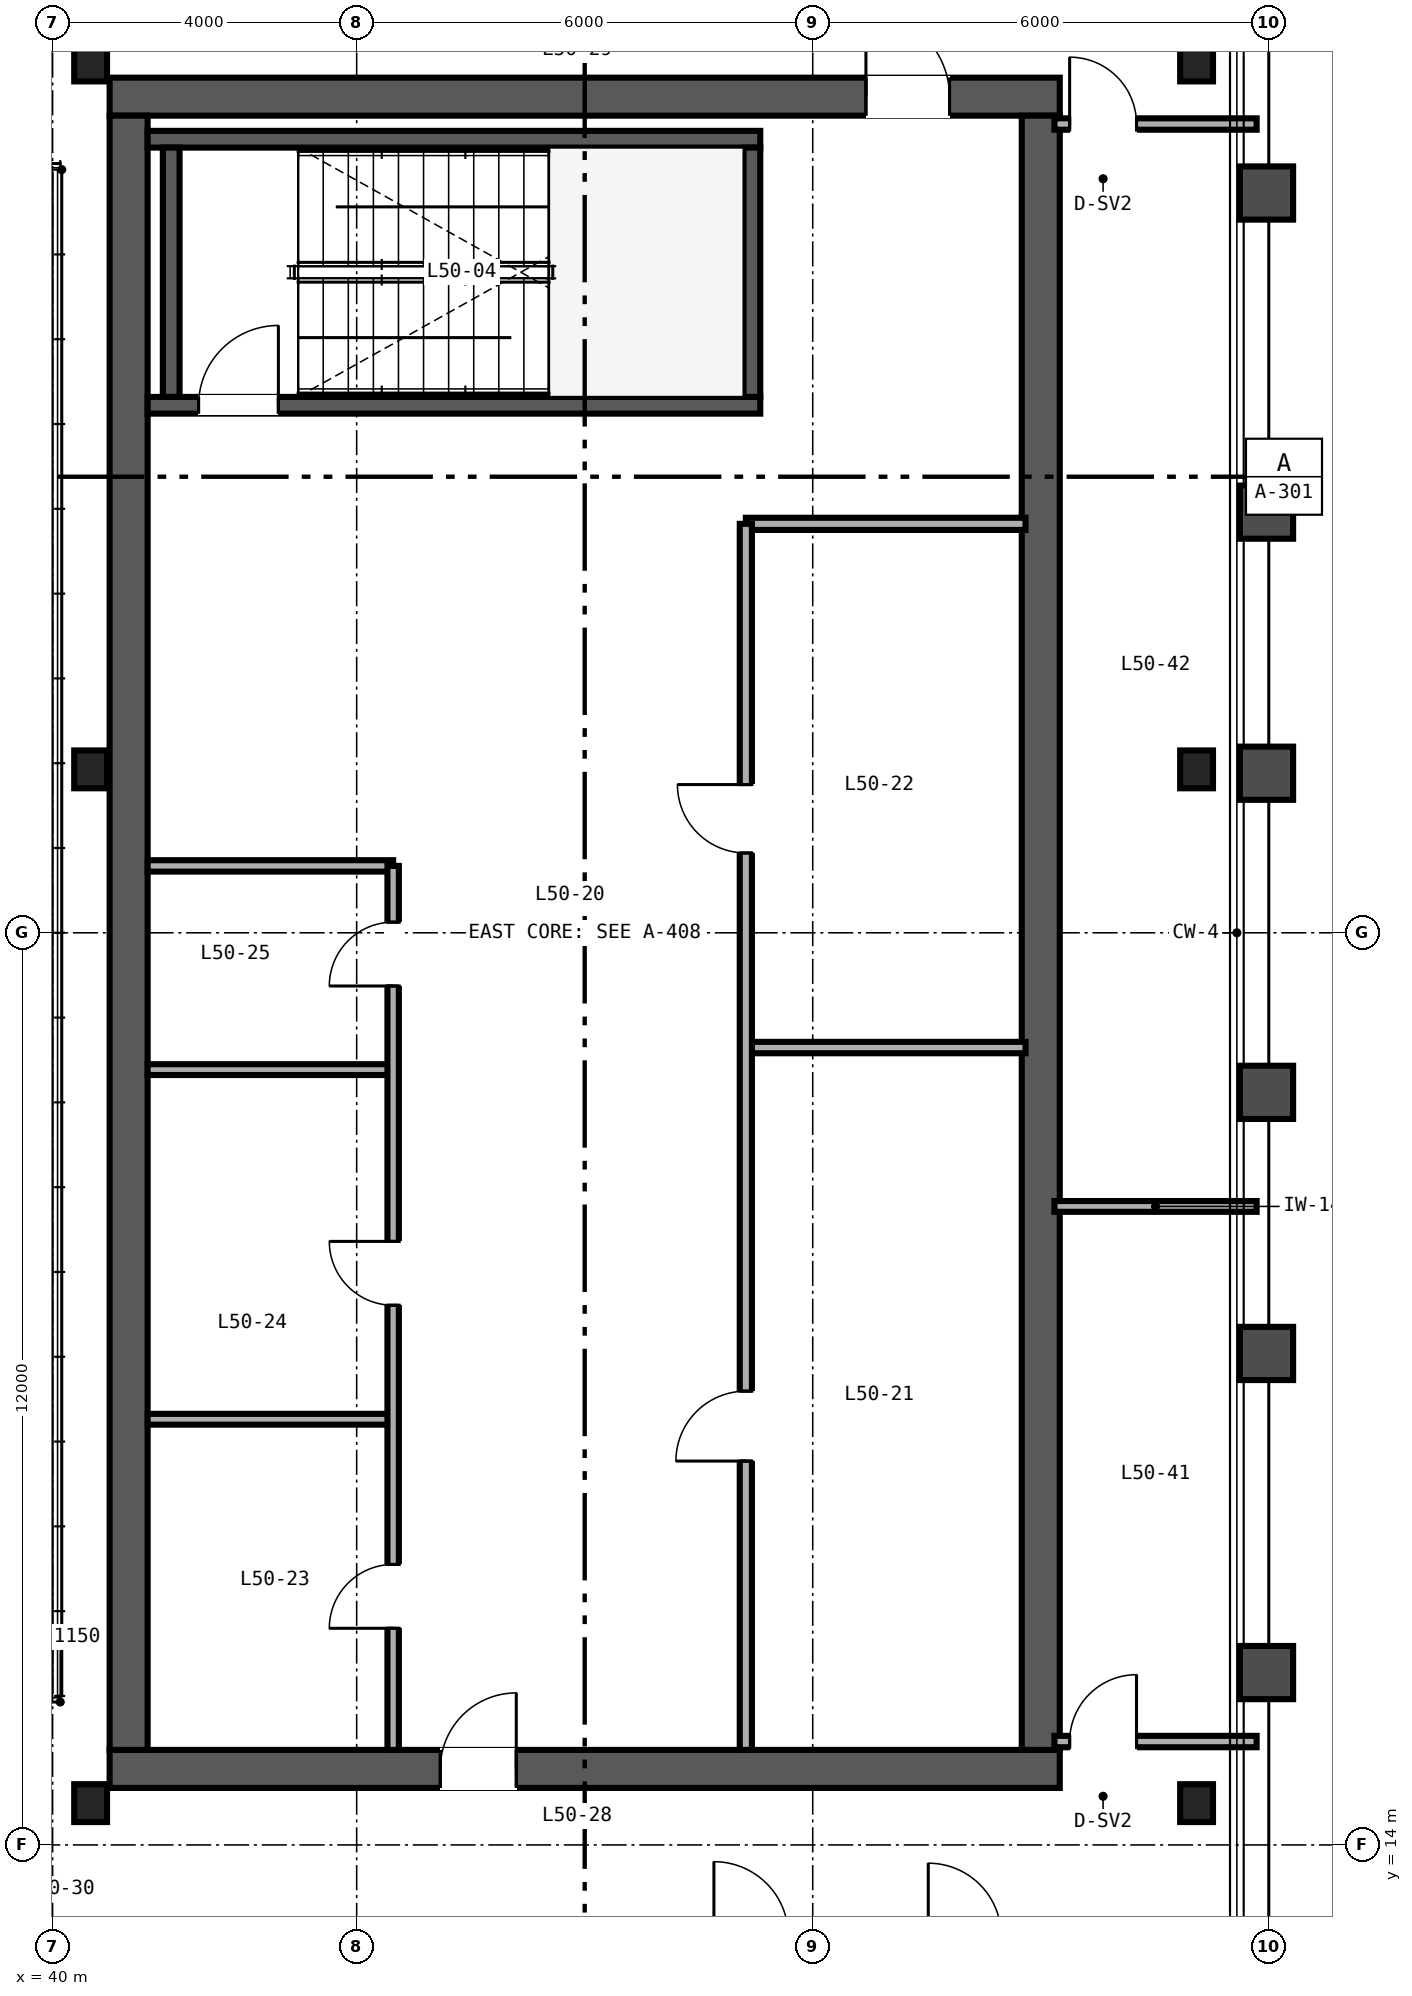
"""IFC4 building model, lengths in metres.
Left out: names, types, materials, properties, quantities, classifications, styles, units other than length and angle.
Written with IfcOpenShell. Run it as: python <this file> out.ifc"""

import sys

from ifc_helpers import new_model, si_unit, direction, frame, frame_2d, origin, origin_2d, place, context, subcontext, project, spatial, rectangle, i_section, extrude, source, transform, mapped, element, fill, save


model = new_model("IFC4")
c1 = context("Model", 3, precision=1e-05, world=origin(), true_north=direction((0.0, 1.0)))
c2 = subcontext(c1, "Body", "Model", "MODEL_VIEW")
j1 = project(units=[si_unit("LENGTHUNIT", "METRE"), si_unit("PLANEANGLEUNIT", "RADIAN")], contexts=[c1])
p1 = place(None, origin())
s1 = spatial("IfcSite", under=j1, at=p1, CompositionType="ELEMENT")
p2 = place(p1, origin())
s2 = spatial("IfcBuilding", under=s1, at=p2, CompositionType="ELEMENT")
p3 = place(p2, frame((0.0, 0.0, 199.2)))
s3 = spatial("IfcBuildingStorey", under=s2, at=p3, CompositionType="ELEMENT", Elevation=199.2)
p4 = place(p3, frame((40.75, 15.0, 0.0), z_axis=(0.0, 0.0, 1.0), x_axis=(1.0, 0.0, 0.0)))
e1 = element("IfcWall", 1, at=p4, inside=s3, PredefinedType="SHEAR", context=c2, shape_type="SweptSolid", body=[
    extrude(rectangle(XDim=12.5, YDim=0.5, at=frame_2d((6.25, 0.0))), origin(), (0.0, 0.0, 1.0), 3.37),
])
p5 = place(p4, frame((4.35, 0.0, 0.0)))
e2 = element("IfcOpeningElement", 2, at=p5, cuts=e1, PredefinedType="OPENING", context=c2, shape_type="SweptSolid", body=[
    extrude(rectangle(XDim=1.0, YDim=2.15, at=frame_2d((0.5, 1.075))), frame((0.0, 0.26, 0.0), z_axis=(0.0, -1.0, 0.0), x_axis=(1.0, 0.0, 0.0)), (0.0, 0.0, 1.0), 0.52),
])
p6 = place(p3, frame((40.75, 37.0, 0.0), z_axis=(0.0, 0.0, 1.0), x_axis=(1.0, 0.0, 0.0)))
e3 = element("IfcWall", 3, at=p6, inside=s3, PredefinedType="SHEAR", context=c2, shape_type="SweptSolid", body=[
    extrude(rectangle(XDim=12.5, YDim=0.5, at=frame_2d((6.25, 0.0))), origin(), (0.0, 0.0, 1.0), 3.37),
])
p7 = place(p6, frame((9.95, 0.0, 0.0)))
e4 = element("IfcOpeningElement", 4, at=p7, cuts=e3, PredefinedType="OPENING", context=c2, shape_type="SweptSolid", body=[
    extrude(rectangle(XDim=1.1, YDim=2.15, at=frame_2d((0.55, 1.075))), frame((0.0, 0.26, 0.0), z_axis=(0.0, -1.0, 0.0), x_axis=(1.0, 0.0, 0.0)), (0.0, 0.0, 1.0), 0.52),
])
for number, where, z_axis, x_axis in (
    (5, (41.0, 15.25, 0.0), (0.0, 0.0, 1.0), (0.0, 1.0, 0.0)),
    (6, (53.0, 15.25, 0.0), (0.0, 0.0, 1.0), (0.0, 1.0, 0.0)),
):
    element("IfcWall", number, at=place(p3, frame(where, z_axis=z_axis, x_axis=x_axis)), inside=s3, PredefinedType="SHEAR", context=c2, shape_type="SweptSolid", body=[
        extrude(rectangle(XDim=21.5, YDim=0.5, at=frame_2d((10.75, 0.0))), origin(), (0.0, 0.0, 1.0), 3.37),
    ])
p8 = place(p3, frame((41.25, 32.94, 0.0), z_axis=(0.0, 0.0, 1.0), x_axis=(1.0, 0.0, 0.0)))
e7 = element("IfcWall", 7, at=p8, inside=s3, PredefinedType="SHEAR", context=c2, shape_type="SweptSolid", body=[
    extrude(rectangle(XDim=8.06, YDim=0.22, at=frame_2d((4.03, 0.0))), origin(), (0.0, 0.0, 1.0), 3.4),
])
p9 = place(p8, frame((0.67, 0.0, 0.0)))
e8 = element("IfcOpeningElement", 8, at=p9, cuts=e7, PredefinedType="OPENING", context=c2, shape_type="SweptSolid", body=[
    extrude(rectangle(XDim=1.05, YDim=2.15, at=frame_2d((0.525, 1.075))), frame((0.0, 0.12, 0.0), z_axis=(0.0, -1.0, 0.0), x_axis=(1.0, 0.0, 0.0)), (0.0, 0.0, 1.0), 0.24),
])
p10 = place(p3, frame((41.25, 36.44, 0.0), z_axis=(0.0, 0.0, 1.0), x_axis=(1.0, 0.0, 0.0)))
e9 = element("IfcWall", 9, at=p10, inside=s3, PredefinedType="SHEAR", context=c2, shape_type="SweptSolid", body=[
    extrude(rectangle(XDim=8.06, YDim=0.22, at=frame_2d((4.03, 0.0))), origin(), (0.0, 0.0, 1.0), 3.4),
])
for number, where, z_axis, x_axis in (
    (10, (41.56, 33.05, 0.0), (0.0, 0.0, 1.0), (0.0, 1.0, 0.0)),
    (11, (49.2, 33.05, 0.0), (0.0, 0.0, 1.0), (0.0, 1.0, 0.0)),
):
    element("IfcWall", number, at=place(p3, frame(where, z_axis=z_axis, x_axis=x_axis)), inside=s3, PredefinedType="SHEAR", context=c2, shape_type="SweptSolid", body=[
        extrude(rectangle(XDim=3.28, YDim=0.22, at=frame_2d((1.64, 0.0))), origin(), (0.0, 0.0, 1.0), 3.4),
    ])
m1 = source(origin(), c2, "Body", "SweptSolid", [
    extrude(i_section(OverallWidth=0.432, OverallDepth=0.498, WebThickness=0.056, FlangeThickness=0.089, FilletRadius=0.025, at=origin_2d()), origin(), (0.0, 0.0, 1.0), 3.37),
])
for number, where, z_axis, x_axis in (
    (12, (40.5, 14.55, 0.0), (0.0, 0.0, 1.0), (1.0, 0.0, 0.0)),
    (13, (55.05, 14.55, 0.0), (0.0, 0.0, 1.0), (1.0, 0.0, 0.0)),
    (14, (40.5, 28.15, 0.0), (0.0, 0.0, 1.0), (1.0, 0.0, 0.0)),
    (15, (55.05, 28.15, 0.0), (0.0, 0.0, 1.0), (1.0, 0.0, 0.0)),
    (16, (40.5, 37.45, 0.0), (0.0, 0.0, 1.0), (1.0, 0.0, 0.0)),
    (17, (55.05, 37.45, 0.0), (0.0, 0.0, 1.0), (1.0, 0.0, 0.0)),
):
    element("IfcColumn", number, at=place(p3, frame(where, z_axis=z_axis, x_axis=x_axis)), inside=s3, PredefinedType="COLUMN", context=c2, shape_type="MappedRepresentation", body=[
        mapped(m1, transform((0.0, 0.0, 0.0), scale=1.0)),
    ])
p11 = place(p3, frame((49.12, 31.38, 0.0), z_axis=(0.0, 0.0, 1.0), x_axis=(1.0, 0.0, 0.0)))
e18 = element("IfcWall", 18, at=p11, inside=s3, PredefinedType="PARTITIONING", context=c2, shape_type="SweptSolid", body=[
    extrude(rectangle(XDim=3.68, YDim=0.16, at=frame_2d((1.84, 0.0))), origin(), (0.0, 0.0, 1.0), 2.47),
])
p12 = place(p3, frame((49.12, 24.49, 0.0), z_axis=(0.0, 0.0, 1.0), x_axis=(1.0, 0.0, 0.0)))
e19 = element("IfcWall", 19, at=p12, inside=s3, PredefinedType="PARTITIONING", context=c2, shape_type="SweptSolid", body=[
    extrude(rectangle(XDim=3.68, YDim=0.15, at=frame_2d((1.84, 0.0))), origin(), (0.0, 0.0, 1.0), 3.37),
])
p13 = place(p3, frame((49.12, 15.25, 0.0), z_axis=(0.0, 0.0, 1.0), x_axis=(0.0, 1.0, 0.0)))
e20 = element("IfcWall", 20, at=p13, inside=s3, PredefinedType="PARTITIONING", context=c2, shape_type="SweptSolid", body=[
    extrude(rectangle(XDim=16.13, YDim=0.16, at=frame_2d((8.065, 0.0))), origin(), (0.0, 0.0, 1.0), 2.443),
])
p14 = place(p13, frame((3.8, 0.0, 0.0)))
e21 = element("IfcOpeningElement", 21, at=p14, cuts=e20, PredefinedType="OPENING", context=c2, shape_type="SweptSolid", body=[
    extrude(rectangle(XDim=0.92, YDim=2.15, at=frame_2d((0.46, 1.075))), frame((0.0, 0.09, 0.0), z_axis=(0.0, -1.0, 0.0), x_axis=(1.0, 0.0, 0.0)), (0.0, 0.0, 1.0), 0.18),
])
p15 = place(p13, frame((11.8, 0.0, 0.0)))
e22 = element("IfcOpeningElement", 22, at=p15, cuts=e20, PredefinedType="OPENING", context=c2, shape_type="SweptSolid", body=[
    extrude(rectangle(XDim=0.9, YDim=2.15, at=frame_2d((0.45, 1.075))), frame((0.0, 0.09, 0.0), z_axis=(0.0, -1.0, 0.0), x_axis=(1.0, 0.0, 0.0)), (0.0, 0.0, 1.0), 0.18),
])
p16 = place(p3, frame((41.25, 26.88, 0.0), z_axis=(0.0, 0.0, 1.0), x_axis=(1.0, 0.0, 0.0)))
e23 = element("IfcWall", 23, at=p16, inside=s3, PredefinedType="PARTITIONING", context=c2, shape_type="SweptSolid", body=[
    extrude(rectangle(XDim=3.23, YDim=0.15, at=frame_2d((1.615, 0.0))), origin(), (0.0, 0.0, 1.0), 3.37),
])
for number, where, z_axis, x_axis in (
    (24, (41.25, 19.6, 0.0), (0.0, 0.0, 1.0), (1.0, 0.0, 0.0)),
    (25, (41.25, 24.2, 0.0), (0.0, 0.0, 1.0), (1.0, 0.0, 0.0)),
):
    element("IfcWall", number, at=place(p3, frame(where, z_axis=z_axis, x_axis=x_axis)), inside=s3, PredefinedType="PARTITIONING", context=c2, shape_type="SweptSolid", body=[
        extrude(rectangle(XDim=3.23, YDim=0.142, at=frame_2d((1.615, 0.0))), origin(), (0.0, 0.0, 1.0), 3.37),
    ])
p17 = place(p3, frame((44.48, 15.25, 0.0), z_axis=(0.0, 0.0, 1.0), x_axis=(0.0, 1.0, 0.0)))
e26 = element("IfcWall", 26, at=p17, inside=s3, PredefinedType="PARTITIONING", context=c2, shape_type="SweptSolid", body=[
    extrude(rectangle(XDim=11.63, YDim=0.15, at=frame_2d((5.815, 0.0))), origin(), (0.0, 0.0, 1.0), 3.37),
])
p18 = place(p17, frame((1.6, 0.0, 0.0)))
e27 = element("IfcOpeningElement", 27, at=p18, cuts=e26, PredefinedType="OPENING", context=c2, shape_type="SweptSolid", body=[
    extrude(rectangle(XDim=0.84, YDim=2.1, at=frame_2d((0.42, 1.05))), frame((0.0, 0.085, 0.0), z_axis=(0.0, -1.0, 0.0), x_axis=(1.0, 0.0, 0.0)), (0.0, 0.0, 1.0), 0.17),
])
p19 = place(p17, frame((5.85, 0.0, 0.0)))
e28 = element("IfcOpeningElement", 28, at=p19, cuts=e26, PredefinedType="OPENING", context=c2, shape_type="SweptSolid", body=[
    extrude(rectangle(XDim=0.84, YDim=2.1, at=frame_2d((0.42, 1.05))), frame((0.0, 0.085, 0.0), z_axis=(0.0, -1.0, 0.0), x_axis=(1.0, 0.0, 0.0)), (0.0, 0.0, 1.0), 0.17),
])
p20 = place(p17, frame((10.05, 0.0, 0.0)))
e29 = element("IfcOpeningElement", 29, at=p20, cuts=e26, PredefinedType="OPENING", context=c2, shape_type="SweptSolid", body=[
    extrude(rectangle(XDim=0.84, YDim=2.1, at=frame_2d((0.42, 1.05))), frame((0.0, 0.085, 0.0), z_axis=(0.0, -1.0, 0.0), x_axis=(1.0, 0.0, 0.0)), (0.0, 0.0, 1.0), 0.17),
])
p21 = place(p3, frame((53.18, 15.36, 0.0), z_axis=(0.0, 0.0, 1.0), x_axis=(1.0, 0.0, 0.0)))
e30 = element("IfcWall", 30, at=p21, inside=s3, PredefinedType="PARTITIONING", context=c2, shape_type="SweptSolid", body=[
    extrude(rectangle(XDim=2.66, YDim=0.15, at=frame_2d((1.33, 0.0))), origin(), (0.0, 0.0, 1.0), 2.591),
])
p22 = place(p21, frame((0.2, 0.0, 0.0)))
e31 = element("IfcOpeningElement", 31, at=p22, cuts=e30, PredefinedType="OPENING", context=c2, shape_type="SweptSolid", body=[
    extrude(rectangle(XDim=0.88, YDim=2.15, at=frame_2d((0.44, 1.075))), frame((0.0, 0.085, 0.0), z_axis=(0.0, -1.0, 0.0), x_axis=(1.0, 0.0, 0.0)), (0.0, 0.0, 1.0), 0.17),
])
p23 = place(p3, frame((53.18, 36.64, 0.0), z_axis=(0.0, 0.0, 1.0), x_axis=(1.0, 0.0, 0.0)))
e32 = element("IfcWall", 32, at=p23, inside=s3, PredefinedType="PARTITIONING", context=c2, shape_type="SweptSolid", body=[
    extrude(rectangle(XDim=2.66, YDim=0.15, at=frame_2d((1.33, 0.0))), origin(), (0.0, 0.0, 1.0), 2.753),
])
p24 = place(p23, frame((0.2, 0.0, 0.0)))
e33 = element("IfcOpeningElement", 33, at=p24, cuts=e32, PredefinedType="OPENING", context=c2, shape_type="SweptSolid", body=[
    extrude(rectangle(XDim=0.88, YDim=2.15, at=frame_2d((0.44, 1.075))), frame((0.0, 0.085, 0.0), z_axis=(0.0, -1.0, 0.0), x_axis=(1.0, 0.0, 0.0)), (0.0, 0.0, 1.0), 0.17),
])
p25 = place(p3, frame((53.18, 22.4, 0.0), z_axis=(0.0, 0.0, 1.0), x_axis=(1.0, 0.0, 0.0)))
e34 = element("IfcWall", 34, at=p25, inside=s3, PredefinedType="PARTITIONING", context=c2, shape_type="SweptSolid", body=[
    extrude(rectangle(XDim=2.66, YDim=0.142, at=frame_2d((1.33, 0.0))), origin(), (0.0, 0.0, 1.0), 2.591),
])
m2 = source(origin(), c2, "Body", "SweptSolid", [
    extrude(rectangle(XDim=1.05, YDim=2.15, at=frame_2d((0.525, 1.075))), frame((0.0, 0.025, 0.0), z_axis=(0.0, -1.0, 0.0), x_axis=(1.0, 0.0, 0.0)), (0.0, 0.0, 1.0), 0.05),
])
p26 = place(p9, origin())
e35 = element("IfcDoor", 35, at=p26, inside=s3, OperationType="SINGLE_SWING_RIGHT", PredefinedType="DOOR", context=c2, shape_type="MappedRepresentation", body=[
    mapped(m2, transform((0.0, 0.0, 0.0), scale=1.0)),
])
fill(e8, e35)
m3 = source(origin(), c2, "Body", "SweptSolid", [
    extrude(rectangle(XDim=1.0, YDim=2.15, at=frame_2d((0.5, 1.075))), frame((0.0, 0.025, 0.0), z_axis=(0.0, -1.0, 0.0), x_axis=(1.0, 0.0, 0.0)), (0.0, 0.0, 1.0), 0.05),
])
p27 = place(p5, origin())
e36 = element("IfcDoor", 36, at=p27, inside=s3, OperationType="SINGLE_SWING_RIGHT", PredefinedType="DOOR", context=c2, shape_type="MappedRepresentation", body=[
    mapped(m3, transform((0.0, 0.0, 0.0), scale=1.0)),
])
fill(e2, e36)
m4 = source(origin(), c2, "Body", "SweptSolid", [
    extrude(rectangle(XDim=1.1, YDim=2.15, at=frame_2d((0.55, 1.075))), frame((0.0, 0.025, 0.0), z_axis=(0.0, -1.0, 0.0), x_axis=(1.0, 0.0, 0.0)), (0.0, 0.0, 1.0), 0.05),
])
p28 = place(p7, origin())
e37 = element("IfcDoor", 37, at=p28, inside=s3, OperationType="SINGLE_SWING_LEFT", PredefinedType="DOOR", context=c2, shape_type="MappedRepresentation", body=[
    mapped(m4, transform((0.0, 0.0, 0.0), scale=1.0)),
])
fill(e4, e37)
m5 = source(origin(), c2, "Body", "SweptSolid", [
    extrude(rectangle(XDim=0.92, YDim=2.15, at=frame_2d((0.46, 1.075))), frame((0.0, 0.025, 0.0), z_axis=(0.0, -1.0, 0.0), x_axis=(1.0, 0.0, 0.0)), (0.0, 0.0, 1.0), 0.05),
])
p29 = place(p14, origin())
e38 = element("IfcDoor", 38, at=p29, inside=s3, OperationType="SINGLE_SWING_LEFT", PredefinedType="DOOR", context=c2, shape_type="MappedRepresentation", body=[
    mapped(m5, transform((0.0, 0.0, 0.0), scale=1.0)),
])
fill(e21, e38)
m6 = source(origin(), c2, "Body", "SweptSolid", [
    extrude(rectangle(XDim=0.9, YDim=2.15, at=frame_2d((0.45, 1.075))), frame((0.0, 0.025, 0.0), z_axis=(0.0, -1.0, 0.0), x_axis=(1.0, 0.0, 0.0)), (0.0, 0.0, 1.0), 0.05),
])
p30 = place(p15, origin())
e39 = element("IfcDoor", 39, at=p30, inside=s3, OperationType="SINGLE_SWING_RIGHT", PredefinedType="DOOR", context=c2, shape_type="MappedRepresentation", body=[
    mapped(m6, transform((0.0, 0.0, 0.0), scale=1.0)),
])
fill(e22, e39)
m7 = source(origin(), c2, "Body", "SweptSolid", [
    extrude(rectangle(XDim=0.84, YDim=2.1, at=frame_2d((0.42, 1.05))), frame((0.0, 0.025, 0.0), z_axis=(0.0, -1.0, 0.0), x_axis=(1.0, 0.0, 0.0)), (0.0, 0.0, 1.0), 0.05),
])
p31 = place(p18, origin())
e40 = element("IfcDoor", 40, at=p31, inside=s3, OperationType="SINGLE_SWING_LEFT", PredefinedType="DOOR", context=c2, shape_type="MappedRepresentation", body=[
    mapped(m7, transform((0.0, 0.0, 0.0), scale=1.0)),
])
fill(e27, e40)
p32 = place(p19, origin())
e41 = element("IfcDoor", 41, at=p32, inside=s3, OperationType="SINGLE_SWING_RIGHT", PredefinedType="DOOR", context=c2, shape_type="MappedRepresentation", body=[
    mapped(m7, transform((0.0, 0.0, 0.0), scale=1.0)),
])
fill(e28, e41)
p33 = place(p20, origin())
e42 = element("IfcDoor", 42, at=p33, inside=s3, OperationType="SINGLE_SWING_LEFT", PredefinedType="DOOR", context=c2, shape_type="MappedRepresentation", body=[
    mapped(m7, transform((0.0, 0.0, 0.0), scale=1.0)),
])
fill(e29, e42)
m8 = source(origin(), c2, "Body", "SweptSolid", [
    extrude(rectangle(XDim=0.88, YDim=2.15, at=frame_2d((0.44, 1.075))), frame((0.0, 0.025, 0.0), z_axis=(0.0, -1.0, 0.0), x_axis=(1.0, 0.0, 0.0)), (0.0, 0.0, 1.0), 0.05),
])
p34 = place(p22, origin())
e43 = element("IfcDoor", 43, at=p34, inside=s3, OperationType="SINGLE_SWING_RIGHT", PredefinedType="DOOR", context=c2, shape_type="MappedRepresentation", body=[
    mapped(m8, transform((0.0, 0.0, 0.0), scale=1.0)),
])
fill(e31, e43)
p35 = place(p24, origin())
e44 = element("IfcDoor", 44, at=p35, inside=s3, OperationType="SINGLE_SWING_LEFT", PredefinedType="DOOR", context=c2, shape_type="MappedRepresentation", body=[
    mapped(m8, transform((0.0, 0.0, 0.0), scale=1.0)),
])
fill(e33, e44)
save(model, sys.argv[1])
